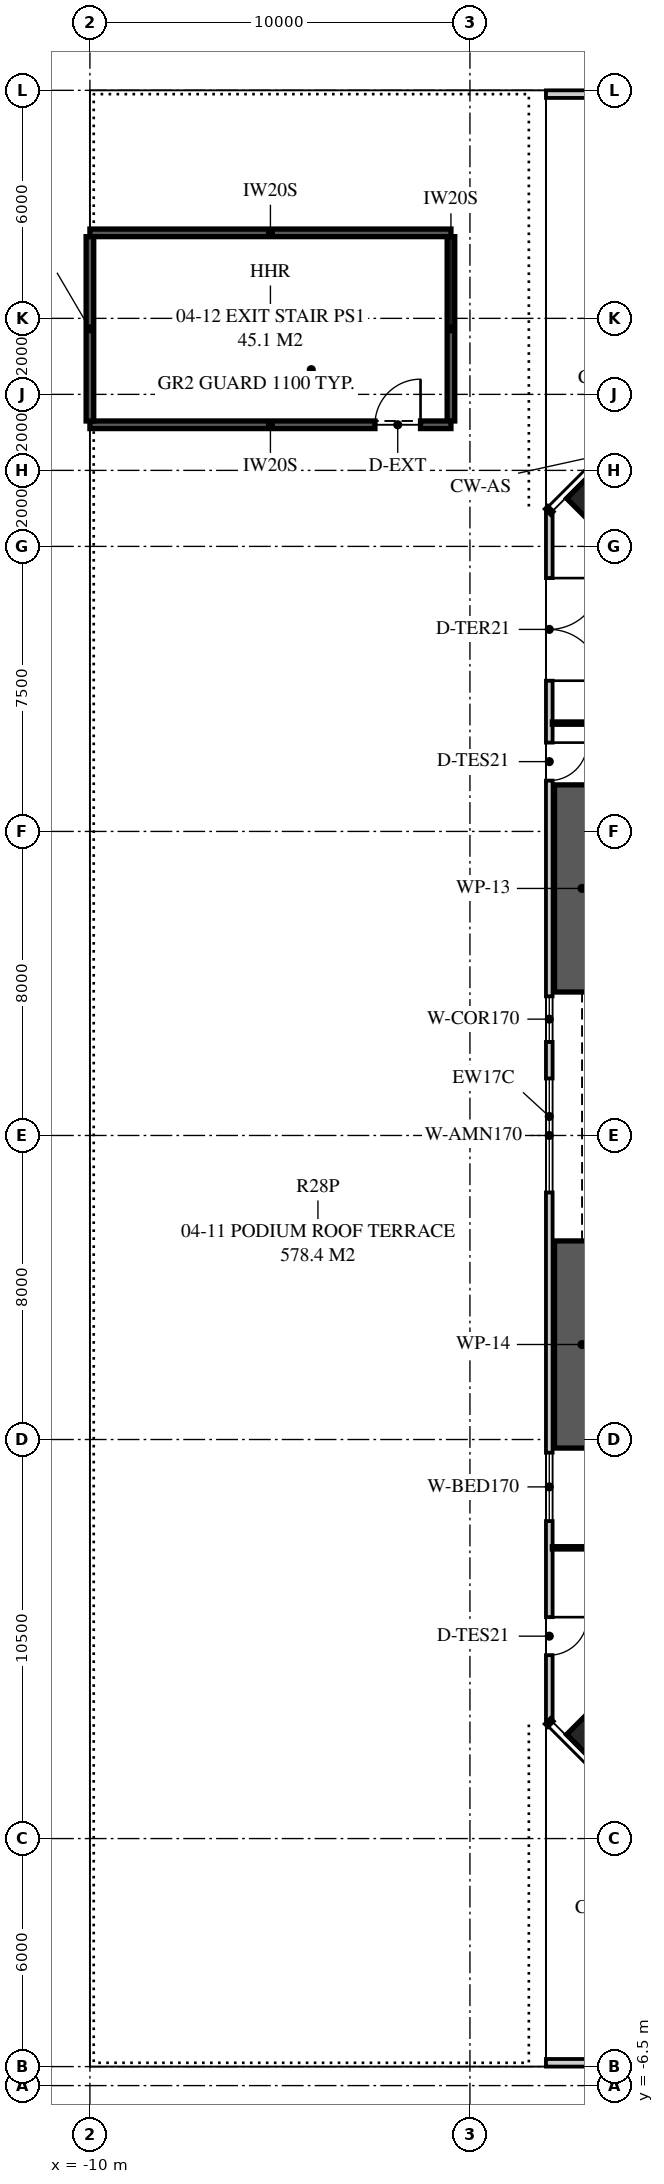
"""IFC4 building model, lengths in metres.
Left out: names, types, materials, properties, quantities, classifications, styles, units other than length and angle.
Written with IfcOpenShell. Run it as: python <this file> out.ifc"""

import sys

from ifc_helpers import new_model, si_unit, direction, frame, frame_2d, origin, origin_2d, place, context, subcontext, project, spatial, polyline, rectangle, outline, extrude, element, fill, save


model = new_model("IFC4")
c1 = context("Model", 3, precision=1e-05, world=origin(), true_north=direction((0.0, 1.0)))
c2 = subcontext(c1, "Body", "Model", "MODEL_VIEW")
j1 = project(units=[si_unit("LENGTHUNIT", "METRE"), si_unit("PLANEANGLEUNIT", "RADIAN")], contexts=[c1])
p1 = place(None, origin())
s1 = spatial("IfcSite", under=j1, at=p1, CompositionType="ELEMENT")
p2 = place(p1, origin())
s2 = spatial("IfcBuilding", under=s1, at=p2, CompositionType="ELEMENT")
p3 = place(p2, frame((0.0, 0.0, 21.0)))
s3 = spatial("IfcBuildingStorey", under=s2, at=p3, CompositionType="ELEMENT", Elevation=21.0)
for number, where, z_axis, x_axis in (
    (1, (4.631, 2.631, 0.0), (0.0, 0.0, 1.0), (0.707, 0.707, 0.0)),
    (2, (4.631, 35.369, 0.0), (0.0, 0.0, 1.0), (0.707, -0.707, 0.0)),
):
    element("IfcColumn", number, at=place(p3, frame(where, z_axis=z_axis, x_axis=x_axis)), inside=s3, PredefinedType="COLUMN", context=c2, shape_type="SweptSolid", body=[
        extrude(rectangle(XDim=2.8, YDim=3.1, at=origin_2d()), origin(), (0.0, 0.0, 1.0), 3.35),
    ])
p4 = place(p3, frame((2.087, 34.949, 0.0), z_axis=(0.0, 0.0, 1.0), x_axis=(0.0, -1.0, 0.0)))
e3 = element("IfcWall", 3, at=p4, inside=s3, PredefinedType="SOLIDWALL", context=c2, shape_type="SweptSolid", body=[
    extrude(outline(polyline([(0.0, 0.0), (31.897, 0.0), (31.897, 3.11), (22.167, 3.11), (22.167, 2.15), (22.074, 2.15), (22.074, 3.11), (21.949, 3.11), (21.949, 2.15), (9.949, 2.15), (9.949, 3.11), (9.823, 3.11), (9.823, 2.15), (9.73, 2.15), (9.73, 3.11), (0.0, 3.11), (0.0, 0.0)])), frame((0.0, 0.087, 0.0), z_axis=(0.0, -1.0, 0.0), x_axis=(1.0, 0.0, 0.0)), (0.0, 0.0, 1.0), 0.175),
])
p5 = place(p4, frame((1.783, 0.0, 0.0)))
e4 = element("IfcOpeningElement", 4, at=p5, cuts=e3, PredefinedType="OPENING", context=c2, shape_type="SweptSolid", body=[
    extrude(rectangle(XDim=2.7, YDim=2.1, at=frame_2d((1.35, 1.05))), frame((0.0, 0.097, 0.0), z_axis=(0.0, -1.0, 0.0), x_axis=(1.0, 0.0, 0.0)), (0.0, 0.0, 1.0), 0.195),
])
p6 = place(p4, frame((6.112, 0.0, 0.0)))
e5 = element("IfcOpeningElement", 5, at=p6, cuts=e3, PredefinedType="OPENING", context=c2, shape_type="SweptSolid", body=[
    extrude(rectangle(XDim=1.0, YDim=2.1, at=frame_2d((0.5, 1.05))), frame((0.0, 0.097, 0.0), z_axis=(0.0, -1.0, 0.0), x_axis=(1.0, 0.0, 0.0)), (0.0, 0.0, 1.0), 0.195),
])
p7 = place(p4, frame((12.788, 0.0, 0.4)))
e6 = element("IfcOpeningElement", 6, at=p7, cuts=e3, PredefinedType="OPENING", context=c2, shape_type="SweptSolid", body=[
    extrude(rectangle(XDim=1.2, YDim=1.7, at=frame_2d((0.6, 0.85))), frame((0.0, 0.097, 0.0), z_axis=(0.0, -1.0, 0.0), x_axis=(1.0, 0.0, 0.0)), (0.0, 0.0, 1.0), 0.195),
])
p8 = place(p4, frame((14.949, 0.0, 0.4)))
e7 = element("IfcOpeningElement", 7, at=p8, cuts=e3, PredefinedType="OPENING", context=c2, shape_type="SweptSolid", body=[
    extrude(rectangle(XDim=3.0, YDim=1.7, at=frame_2d((1.5, 0.85))), frame((0.0, 0.097, 0.0), z_axis=(0.0, -1.0, 0.0), x_axis=(1.0, 0.0, 0.0)), (0.0, 0.0, 1.0), 0.195),
])
p9 = place(p4, frame((24.795, 0.0, 0.4)))
e8 = element("IfcOpeningElement", 8, at=p9, cuts=e3, PredefinedType="OPENING", context=c2, shape_type="SweptSolid", body=[
    extrude(rectangle(XDim=1.8, YDim=1.7, at=frame_2d((0.9, 0.85))), frame((0.0, 0.097, 0.0), z_axis=(0.0, -1.0, 0.0), x_axis=(1.0, 0.0, 0.0)), (0.0, 0.0, 1.0), 0.195),
])
p10 = place(p4, frame((29.123, 0.0, 0.0)))
e9 = element("IfcOpeningElement", 9, at=p10, cuts=e3, PredefinedType="OPENING", context=c2, shape_type="SweptSolid", body=[
    extrude(rectangle(XDim=1.0, YDim=2.1, at=frame_2d((0.5, 1.05))), frame((0.0, 0.097, 0.0), z_axis=(0.0, -1.0, 0.0), x_axis=(1.0, 0.0, 0.0)), (0.0, 0.0, 1.0), 0.195),
])
for number, where, z_axis, x_axis in (
    (10, (2.0, -5.9, 0.0), (0.0, 0.0, 1.0), (1.0, 0.0, 0.0)),
    (11, (59.9, 45.9, 0.0), (0.0, 0.0, 1.0), (-1.0, 0.0, 0.0)),
):
    element("IfcWall", number, at=place(p3, frame(where, z_axis=z_axis, x_axis=x_axis)), inside=s3, PredefinedType="PARAPET", context=c2, shape_type="SweptSolid", body=[
        extrude(rectangle(XDim=57.9, YDim=0.2, at=frame_2d((28.95, 0.0))), origin(), (0.0, 0.0, 1.0), 1.2),
    ])
p11 = place(p3, frame((2.15, 7.65, 0.0), z_axis=(0.0, 0.0, 1.0), x_axis=(1.0, 0.0, 0.0)))
e12 = element("IfcWall", 12, at=p11, inside=s3, PredefinedType="PARTITIONING", context=c2, shape_type="SweptSolid", body=[
    extrude(outline(polyline([(0.0, 0.0), (15.375, 0.0), (15.375, 3.11), (11.137, 3.11), (11.137, 2.541), (10.562, 2.541), (10.562, 3.11), (9.31, 3.11), (9.31, 2.51), (6.79, 2.51), (6.79, 3.11), (2.769, 3.11), (2.769, 2.541), (2.539, 2.541), (2.539, 2.15), (0.796, 2.15), (0.796, 3.11), (0.0, 3.11), (0.0, 0.0)])), frame((0.0, 0.05, 0.0), z_axis=(0.0, -1.0, 0.0), x_axis=(1.0, 0.0, 0.0)), (0.0, 0.0, 1.0), 0.1),
])
p12 = place(p3, frame((2.15, 29.35, 0.0), z_axis=(0.0, 0.0, 1.0), x_axis=(1.0, 0.0, 0.0)))
e13 = element("IfcWall", 13, at=p12, inside=s3, PredefinedType="PARTITIONING", context=c2, shape_type="SweptSolid", body=[
    extrude(outline(polyline([(0.0, 0.0), (15.375, 0.0), (15.375, 3.11), (11.137, 3.11), (11.137, 2.541), (10.562, 2.541), (10.562, 3.11), (9.31, 3.11), (9.31, 2.51), (6.79, 2.51), (6.79, 3.11), (2.769, 3.11), (2.769, 2.541), (2.377, 2.541), (2.377, 2.15), (0.634, 2.15), (0.634, 3.11), (0.0, 3.11), (0.0, 0.0)])), frame((0.0, 0.05, 0.0), z_axis=(0.0, -1.0, 0.0), x_axis=(1.0, 0.0, 0.0)), (0.0, 0.0, 1.0), 0.1),
])
p13 = place(p3, frame((-10.0, 37.2, 0.0), z_axis=(0.0, 0.0, 1.0), x_axis=(1.0, 0.0, 0.0)))
e14 = element("IfcWall", 14, at=p13, inside=s3, PredefinedType="SOLIDWALL", context=c2, shape_type="SweptSolid", body=[
    extrude(rectangle(XDim=9.5, YDim=0.2, at=frame_2d((4.75, 0.0))), origin(), (0.0, 0.0, 1.0), 3.0),
])
p14 = place(p13, frame((7.5, 0.0, 0.0)))
e15 = element("IfcOpeningElement", 15, at=p14, cuts=e14, PredefinedType="OPENING", context=c2, shape_type="SweptSolid", body=[
    extrude(rectangle(XDim=1.2, YDim=2.1, at=frame_2d((0.6, 1.05))), frame((0.0, 0.11, 0.0), z_axis=(0.0, -1.0, 0.0), x_axis=(1.0, 0.0, 0.0)), (0.0, 0.0, 1.0), 0.22),
])
p15 = place(p3, frame((-0.5, 37.3, 0.0), z_axis=(0.0, 0.0, 1.0), x_axis=(0.0, 1.0, 0.0)))
e16 = element("IfcWall", 16, at=p15, inside=s3, PredefinedType="SOLIDWALL", context=c2, shape_type="SweptSolid", body=[
    extrude(rectangle(XDim=4.85, YDim=0.2, at=frame_2d((2.425, 0.0))), origin(), (0.0, 0.0, 1.0), 3.0),
])
p16 = place(p3, frame((-0.5, 42.25, 0.0), z_axis=(0.0, 0.0, 1.0), x_axis=(-1.0, 0.0, 0.0)))
e17 = element("IfcWall", 17, at=p16, inside=s3, PredefinedType="SOLIDWALL", context=c2, shape_type="SweptSolid", body=[
    extrude(rectangle(XDim=9.5, YDim=0.2, at=frame_2d((4.75, 0.0))), origin(), (0.0, 0.0, 1.0), 3.0),
])
p17 = place(p3, frame((-10.0, 42.15, 0.0), z_axis=(0.0, 0.0, 1.0), x_axis=(0.0, -1.0, 0.0)))
e18 = element("IfcWall", 18, at=p17, inside=s3, PredefinedType="SOLIDWALL", context=c2, shape_type="SweptSolid", body=[
    extrude(rectangle(XDim=4.85, YDim=0.2, at=frame_2d((2.425, 0.0))), origin(), (0.0, 0.0, 1.0), 3.0),
])
for number, where, z_axis, x_axis in (
    (19, (2.95, 22.275, 0.0), (0.0, 0.0, 1.0), (0.0, 1.0, 0.0)),
    (20, (2.95, 10.275, 0.0), (0.0, 0.0, 1.0), (0.0, 1.0, 0.0)),
):
    element("IfcWall", number, at=place(p3, frame(where, z_axis=z_axis, x_axis=x_axis)), inside=s3, PredefinedType="SHEAR", context=c2, shape_type="SweptSolid", body=[
        extrude(rectangle(XDim=5.45, YDim=1.45, at=frame_2d((2.725, 0.0))), origin(), (0.0, 0.0, 1.0), 3.35),
    ])
p18 = place(p5, origin())
e21 = element("IfcDoor", 21, at=p18, inside=s3, OperationType="DOUBLE_DOOR_SINGLE_SWING", PredefinedType="DOOR", context=c2, shape_type="SweptSolid", body=[
    extrude(rectangle(XDim=2.7, YDim=2.1, at=frame_2d((1.35, 1.05))), frame((0.0, 0.025, 0.0), z_axis=(0.0, -1.0, 0.0), x_axis=(1.0, 0.0, 0.0)), (0.0, 0.0, 1.0), 0.05),
])
fill(e4, e21)
p19 = place(p6, origin())
e22 = element("IfcDoor", 22, at=p19, inside=s3, OperationType="SINGLE_SWING_LEFT", PredefinedType="DOOR", context=c2, shape_type="SweptSolid", body=[
    extrude(rectangle(XDim=1.0, YDim=2.1, at=frame_2d((0.5, 1.05))), frame((0.0, 0.025, 0.0), z_axis=(0.0, -1.0, 0.0), x_axis=(1.0, 0.0, 0.0)), (0.0, 0.0, 1.0), 0.05),
])
fill(e5, e22)
p20 = place(p7, origin())
e23 = element("IfcWindow", 23, at=p20, inside=s3, PartitioningType="SINGLE_PANEL", PredefinedType="WINDOW", context=c2, shape_type="SweptSolid", body=[
    extrude(rectangle(XDim=1.2, YDim=1.7, at=frame_2d((0.6, 0.85))), frame((0.0, 0.03, 0.0), z_axis=(0.0, -1.0, 0.0), x_axis=(1.0, 0.0, 0.0)), (0.0, 0.0, 1.0), 0.06),
])
fill(e6, e23)
p21 = place(p8, origin())
e24 = element("IfcWindow", 24, at=p21, inside=s3, PartitioningType="SINGLE_PANEL", PredefinedType="WINDOW", context=c2, shape_type="SweptSolid", body=[
    extrude(rectangle(XDim=3.0, YDim=1.7, at=frame_2d((1.5, 0.85))), frame((0.0, 0.03, 0.0), z_axis=(0.0, -1.0, 0.0), x_axis=(1.0, 0.0, 0.0)), (0.0, 0.0, 1.0), 0.06),
])
fill(e7, e24)
p22 = place(p9, origin())
e25 = element("IfcWindow", 25, at=p22, inside=s3, PartitioningType="SINGLE_PANEL", PredefinedType="WINDOW", context=c2, shape_type="SweptSolid", body=[
    extrude(rectangle(XDim=1.8, YDim=1.7, at=frame_2d((0.9, 0.85))), frame((0.0, 0.03, 0.0), z_axis=(0.0, -1.0, 0.0), x_axis=(1.0, 0.0, 0.0)), (0.0, 0.0, 1.0), 0.06),
])
fill(e8, e25)
p23 = place(p10, origin())
e26 = element("IfcDoor", 26, at=p23, inside=s3, OperationType="SINGLE_SWING_LEFT", PredefinedType="DOOR", context=c2, shape_type="SweptSolid", body=[
    extrude(rectangle(XDim=1.0, YDim=2.1, at=frame_2d((0.5, 1.05))), frame((0.0, 0.025, 0.0), z_axis=(0.0, -1.0, 0.0), x_axis=(1.0, 0.0, 0.0)), (0.0, 0.0, 1.0), 0.05),
])
fill(e9, e26)
p24 = place(p14, origin())
e27 = element("IfcDoor", 27, at=p24, inside=s3, OperationType="SINGLE_SWING_RIGHT", PredefinedType="DOOR", context=c2, shape_type="SweptSolid", body=[
    extrude(rectangle(XDim=1.2, YDim=2.1, at=frame_2d((0.6, 1.05))), frame((0.0, 0.025, 0.0), z_axis=(0.0, -1.0, 0.0), x_axis=(1.0, 0.0, 0.0)), (0.0, 0.0, 1.0), 0.05),
])
fill(e15, e27)
save(model, sys.argv[1])
